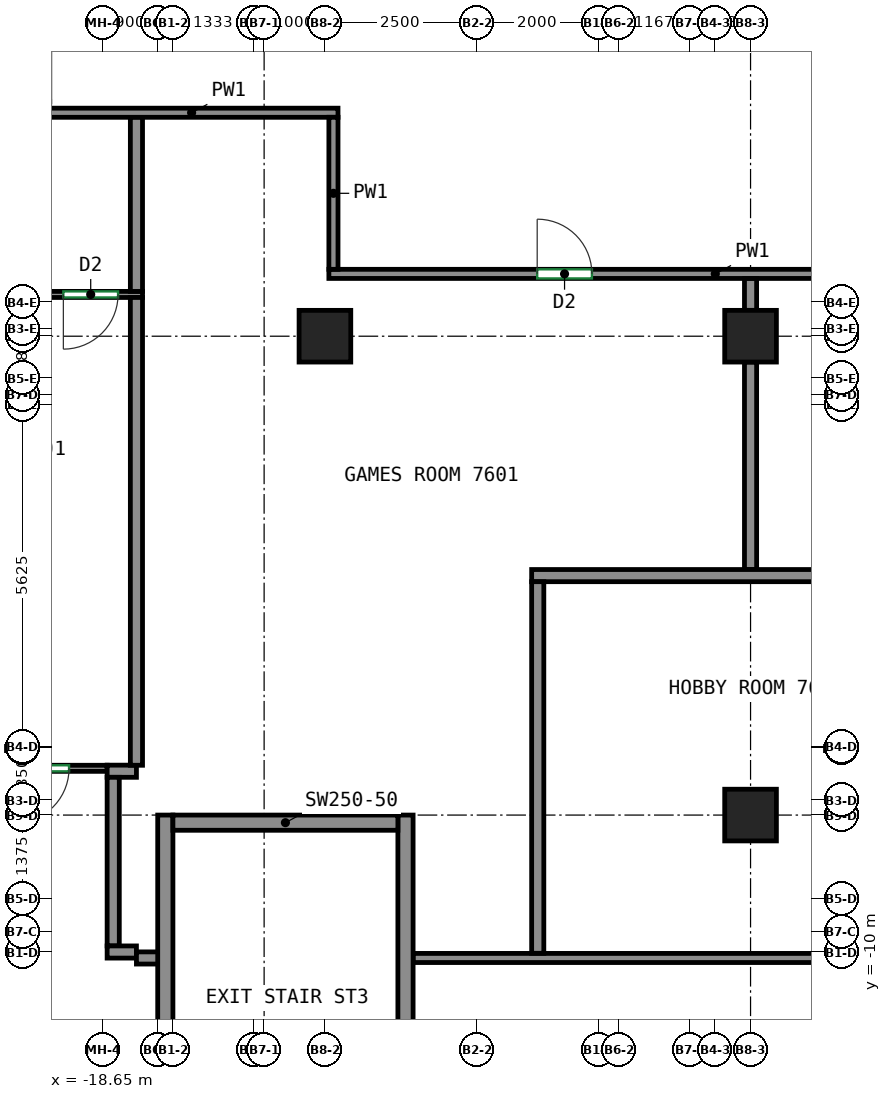
"""IFC4 building model, lengths in metres.
Left out: names, types, materials, properties, quantities, classifications, styles, units other than length and angle.
Written with IfcOpenShell. Run it as: python <this file> out.ifc"""

import sys

from ifc_helpers import new_model, si_unit, direction, frame, frame_2d, origin, origin_2d, place, context, subcontext, project, spatial, rectangle, extrude, source, transform, mapped, element, fill, save


model = new_model("IFC4")
c1 = context("Model", 3, precision=1e-05, world=origin(), true_north=direction((0.0, 1.0)))
c2 = subcontext(c1, "Body", "Model", "MODEL_VIEW")
j1 = project(units=[si_unit("LENGTHUNIT", "METRE"), si_unit("PLANEANGLEUNIT", "RADIAN")], contexts=[c1])
p1 = place(None, origin())
s1 = spatial("IfcSite", under=j1, at=p1, CompositionType="ELEMENT")
p2 = place(p1, origin())
s2 = spatial("IfcBuilding", under=s1, at=p2, CompositionType="ELEMENT")
p3 = place(p2, frame((0.0, 0.0, 305.2)))
s3 = spatial("IfcBuildingStorey", under=s2, at=p3, CompositionType="ELEMENT", Elevation=305.2)
m1 = source(origin(), c2, "Body", "SweptSolid", [
    extrude(rectangle(XDim=0.85, YDim=0.85, at=origin_2d()), origin(), (0.0, 0.0, 1.0), 3.12),
])
for number, where, z_axis, x_axis in (
    (1, (-15.0, 0.125, 0.0), (0.0, 0.0, 1.0), (1.0, 0.0, 0.0)),
    (2, (-8.0, -7.75, 0.0), (0.0, 0.0, 1.0), (1.0, 0.0, 0.0)),
    (3, (-8.0, 0.125, 0.0), (0.0, 0.0, 1.0), (1.0, 0.0, 0.0)),
):
    element("IfcColumn", number, at=place(p3, frame(where, z_axis=z_axis, x_axis=x_axis)), inside=s3, PredefinedType="COLUMN", context=c2, shape_type="MappedRepresentation", body=[
        mapped(m1, transform((0.0, 0.0, 0.0))),
    ])
m2 = source(origin(), c2, "Body", "SweptSolid", [
    extrude(rectangle(XDim=8.0, YDim=0.25, at=frame_2d((4.0, 0.0))), origin(), (0.0, 0.0, 1.0), 3.12),
])
for number, where, z_axis, x_axis in (
    (4, (-17.625, -15.75, 0.0), (0.0, 0.0, 1.0), (0.0, 1.0, 0.0)),
    (5, (-13.675, -15.75, 0.0), (0.0, 0.0, 1.0), (0.0, 1.0, 0.0)),
):
    element("IfcWall", number, at=place(p3, frame(where, z_axis=z_axis, x_axis=x_axis)), inside=s3, PredefinedType="SHEAR", context=c2, shape_type="MappedRepresentation", body=[
        mapped(m2, transform((0.0, 0.0, 0.0))),
    ])
m3 = source(origin(), c2, "Body", "SweptSolid", [
    extrude(rectangle(XDim=3.7, YDim=0.25, at=frame_2d((1.85, 0.0))), origin(), (0.0, 0.0, 1.0), 3.12),
])
p4 = place(p3, frame((-17.5, -7.875, 0.0), z_axis=(0.0, 0.0, 1.0), x_axis=(1.0, 0.0, 0.0)))
e6 = element("IfcWall", 6, at=p4, inside=s3, PredefinedType="SHEAR", context=c2, shape_type="MappedRepresentation", body=[
    mapped(m3, transform((0.0, 0.0, 0.0))),
])
p5 = place(p3, frame((-19.6, 3.8, 0.0), z_axis=(0.0, 0.0, 1.0), x_axis=(1.0, 0.0, 0.0)))
e7 = element("IfcWall", 7, at=p5, inside=s3, PredefinedType="PARTITIONING", context=c2, shape_type="SweptSolid", body=[
    extrude(rectangle(XDim=4.815, YDim=0.15, at=frame_2d((2.408, 0.0))), origin(), (0.0, 0.0, 1.0), 3.12),
])
p6 = place(p3, frame((-14.935, 1.15, 0.0), z_axis=(0.0, 0.0, 1.0), x_axis=(1.0, 0.0, 0.0)))
e8 = element("IfcWall", 8, at=p6, inside=s3, PredefinedType="PARTITIONING", context=c2, shape_type="SweptSolid", body=[
    extrude(rectangle(XDim=12.71, YDim=0.15, at=frame_2d((6.355, 0.0))), origin(), (0.0, 0.0, 1.0), 3.12),
])
p7 = place(p6, frame((3.426, 0.0, 0.0)))
e9 = element("IfcOpeningElement", 9, at=p7, cuts=e8, PredefinedType="OPENING", context=c2, shape_type="SweptSolid", body=[
    extrude(rectangle(XDim=0.9, YDim=2.1, at=frame_2d((0.45, 1.05))), frame((0.0, 0.085, 0.0), z_axis=(0.0, -1.0, 0.0), x_axis=(1.0, 0.0, 0.0)), (0.0, 0.0, 1.0), 0.17),
])
p8 = place(p6, frame((9.571, 0.0, 0.0)))
e10 = element("IfcOpeningElement", 10, at=p8, cuts=e8, PredefinedType="OPENING", context=c2, shape_type="SweptSolid", body=[
    extrude(rectangle(XDim=0.9, YDim=2.1, at=frame_2d((0.45, 1.05))), frame((0.0, 0.085, 0.0), z_axis=(0.0, -1.0, 0.0), x_axis=(1.0, 0.0, 0.0)), (0.0, 0.0, 1.0), 0.17),
])
p9 = place(p3, frame((-14.86, 3.725, 0.0), z_axis=(0.0, 0.0, 1.0), x_axis=(0.0, -1.0, 0.0)))
e11 = element("IfcWall", 11, at=p9, inside=s3, PredefinedType="PARTITIONING", context=c2, shape_type="SweptSolid", body=[
    extrude(rectangle(XDim=2.5, YDim=0.15, at=frame_2d((1.25, 0.0))), origin(), (0.0, 0.0, 1.0), 3.12),
])
p10 = place(p3, frame((-13.55, -10.1, 0.0), z_axis=(0.0, 0.0, 1.0), x_axis=(1.0, 0.0, 0.0)))
e12 = element("IfcWall", 12, at=p10, inside=s3, PredefinedType="PARTITIONING", context=c2, shape_type="SweptSolid", body=[
    extrude(rectangle(XDim=30.65, YDim=0.15, at=frame_2d((15.325, 0.0))), origin(), (0.0, 0.0, 1.0), 3.12),
])
p11 = place(p10, frame((6.956, 0.0, 0.0)))
e13 = element("IfcOpeningElement", 13, at=p11, cuts=e12, PredefinedType="OPENING", context=c2, shape_type="SweptSolid", body=[
    extrude(rectangle(XDim=0.9, YDim=2.1, at=frame_2d((0.45, 1.05))), frame((0.0, 0.085, 0.0), z_axis=(0.0, -1.0, 0.0), x_axis=(1.0, 0.0, 0.0)), (0.0, 0.0, 1.0), 0.17),
])
p12 = place(p10, frame((10.643, 0.0, 0.0)))
e14 = element("IfcOpeningElement", 14, at=p12, cuts=e12, PredefinedType="OPENING", context=c2, shape_type="SweptSolid", body=[
    extrude(rectangle(XDim=0.9, YDim=2.1, at=frame_2d((0.45, 1.05))), frame((0.0, 0.085, 0.0), z_axis=(0.0, -1.0, 0.0), x_axis=(1.0, 0.0, 0.0)), (0.0, 0.0, 1.0), 0.17),
])
p13 = place(p10, frame((24.155, 0.0, 0.0)))
e15 = element("IfcOpeningElement", 15, at=p13, cuts=e12, PredefinedType="OPENING", context=c2, shape_type="SweptSolid", body=[
    extrude(rectangle(XDim=0.9, YDim=2.1, at=frame_2d((0.45, 1.05))), frame((0.0, 0.085, 0.0), z_axis=(0.0, -1.0, 0.0), x_axis=(1.0, 0.0, 0.0)), (0.0, 0.0, 1.0), 0.17),
])
p14 = place(p3, frame((-18.582, -6.981, 0.0), z_axis=(0.0, 0.0, 1.0), x_axis=(-1.0, 0.0, 0.0)))
e16 = element("IfcWall", 16, at=p14, inside=s3, PredefinedType="PARTITIONING", context=c2, shape_type="SweptSolid", body=[
    extrude(rectangle(XDim=6.668, YDim=0.1, at=frame_2d((3.334, 0.0))), origin(), (0.0, 0.0, 1.0), 3.12),
])
p15 = place(p14, frame((0.626, 0.0, 0.0)))
e17 = element("IfcOpeningElement", 17, at=p15, cuts=e16, PredefinedType="OPENING", context=c2, shape_type="SweptSolid", body=[
    extrude(rectangle(XDim=0.9, YDim=2.1, at=frame_2d((0.45, 1.05))), frame((0.0, 0.06, 0.0), z_axis=(0.0, -1.0, 0.0), x_axis=(1.0, 0.0, 0.0)), (0.0, 0.0, 1.0), 0.12),
])
p16 = place(p3, frame((-18.582, -7.029, 0.0), z_axis=(0.0, 0.0, 1.0), x_axis=(1.0, 0.0, 0.0)))
e18 = element("IfcWall", 18, at=p16, inside=s3, PredefinedType="PARTITIONING", context=c2, shape_type="SweptSolid", body=[
    extrude(rectangle(XDim=0.482, YDim=0.2, at=frame_2d((0.241, 0.0))), origin(), (0.0, 0.0, 1.0), 3.12),
])
p17 = place(p3, frame((-18.482, -9.902, 0.0), z_axis=(0.0, 0.0, 1.0), x_axis=(0.0, 1.0, 0.0)))
e19 = element("IfcWall", 19, at=p17, inside=s3, PredefinedType="PARTITIONING", context=c2, shape_type="SweptSolid", body=[
    extrude(rectangle(XDim=2.773, YDim=0.2, at=frame_2d((1.387, 0.0))), origin(), (0.0, 0.0, 1.0), 3.12),
])
p18 = place(p3, frame((-18.1, -10.002, 0.0), z_axis=(0.0, 0.0, 1.0), x_axis=(-1.0, 0.0, 0.0)))
e20 = element("IfcWall", 20, at=p18, inside=s3, PredefinedType="PARTITIONING", context=c2, shape_type="SweptSolid", body=[
    extrude(rectangle(XDim=0.482, YDim=0.2, at=frame_2d((0.241, 0.0))), origin(), (0.0, 0.0, 1.0), 3.12),
])
p19 = place(p3, frame((-17.7, -10.1, 0.0), z_axis=(0.0, 0.0, 1.0), x_axis=(-1.0, 0.0, 0.0)))
e21 = element("IfcWall", 21, at=p19, inside=s3, PredefinedType="PARTITIONING", context=c2, shape_type="SweptSolid", body=[
    extrude(rectangle(XDim=0.4, YDim=0.2, at=frame_2d((0.2, 0.0))), origin(), (0.0, 0.0, 1.0), 3.12),
])
p20 = place(p3, frame((-18.0, 0.812, 0.0), z_axis=(0.0, 0.0, 1.0), x_axis=(-1.0, 0.0, 0.0)))
e22 = element("IfcWall", 22, at=p20, inside=s3, PredefinedType="PARTITIONING", context=c2, shape_type="SweptSolid", body=[
    extrude(rectangle(XDim=7.25, YDim=0.1, at=frame_2d((3.625, 0.0))), origin(), (0.0, 0.0, 1.0), 3.12),
])
p21 = place(p20, frame((0.402, 0.0, 0.0)))
e23 = element("IfcOpeningElement", 23, at=p21, cuts=e22, PredefinedType="OPENING", context=c2, shape_type="SweptSolid", body=[
    extrude(rectangle(XDim=0.9, YDim=2.1, at=frame_2d((0.45, 1.05))), frame((0.0, 0.06, 0.0), z_axis=(0.0, -1.0, 0.0), x_axis=(1.0, 0.0, 0.0)), (0.0, 0.0, 1.0), 0.12),
])
p22 = place(p3, frame((-18.1, -6.931, 0.0), z_axis=(0.0, 0.0, 1.0), x_axis=(0.0, 1.0, 0.0)))
e24 = element("IfcWall", 24, at=p22, inside=s3, PredefinedType="PARTITIONING", context=c2, shape_type="SweptSolid", body=[
    extrude(rectangle(XDim=7.693, YDim=0.2, at=frame_2d((3.846, 0.0))), origin(), (0.0, 0.0, 1.0), 3.12),
])
p23 = place(p3, frame((-18.1, 0.862, 0.0), z_axis=(0.0, 0.0, 1.0), x_axis=(0.0, 1.0, 0.0)))
e25 = element("IfcWall", 25, at=p23, inside=s3, PredefinedType="PARTITIONING", context=c2, shape_type="SweptSolid", body=[
    extrude(rectangle(XDim=2.861, YDim=0.2, at=frame_2d((1.43, 0.0))), origin(), (0.0, 0.0, 1.0), 3.12),
])
p24 = place(p3, frame((-8.0, 0.55, 0.0), z_axis=(0.0, 0.0, 1.0), x_axis=(0.0, 1.0, 0.0)))
e26 = element("IfcWall", 26, at=p24, inside=s3, PredefinedType="PARTITIONING", context=c2, shape_type="SweptSolid", body=[
    extrude(rectangle(XDim=0.523, YDim=0.2, at=frame_2d((0.261, 0.0))), origin(), (0.0, 0.0, 1.0), 3.12),
])
p25 = place(p3, frame((-8.0, -3.712, 0.0), z_axis=(0.0, 0.0, 1.0), x_axis=(0.0, 1.0, 0.0)))
e27 = element("IfcWall", 27, at=p25, inside=s3, PredefinedType="PARTITIONING", context=c2, shape_type="SweptSolid", body=[
    extrude(rectangle(XDim=3.412, YDim=0.2, at=frame_2d((1.706, 0.0))), origin(), (0.0, 0.0, 1.0), 3.12),
])
p26 = place(p3, frame((-11.6, -3.812, 0.0), z_axis=(0.0, 0.0, 1.0), x_axis=(1.0, 0.0, 0.0)))
e28 = element("IfcWall", 28, at=p26, inside=s3, PredefinedType="PARTITIONING", context=c2, shape_type="SweptSolid", body=[
    extrude(rectangle(XDim=28.2, YDim=0.2, at=frame_2d((14.1, 0.0))), origin(), (0.0, 0.0, 1.0), 3.12),
])
p27 = place(p3, frame((-11.5, -10.023, 0.0), z_axis=(0.0, 0.0, 1.0), x_axis=(0.0, 1.0, 0.0)))
e29 = element("IfcWall", 29, at=p27, inside=s3, PredefinedType="PARTITIONING", context=c2, shape_type="SweptSolid", body=[
    extrude(rectangle(XDim=6.111, YDim=0.2, at=frame_2d((3.055, 0.0))), origin(), (0.0, 0.0, 1.0), 3.12),
])
p28 = place(p15, origin())
e30 = element("IfcDoor", 30, at=p28, inside=s3, OperationType="SINGLE_SWING_RIGHT", PredefinedType="DOOR", context=c2, shape_type="SweptSolid", body=[
    extrude(rectangle(XDim=0.9, YDim=2.1, at=frame_2d((0.45, 1.05))), frame((0.0, 0.025, 0.0), z_axis=(0.0, -1.0, 0.0), x_axis=(1.0, 0.0, 0.0)), (0.0, 0.0, 1.0), 0.05),
])
fill(e17, e30)
p29 = place(p21, origin())
e31 = element("IfcDoor", 31, at=p29, inside=s3, OperationType="SINGLE_SWING_RIGHT", PredefinedType="DOOR", context=c2, shape_type="SweptSolid", body=[
    extrude(rectangle(XDim=0.9, YDim=2.1, at=frame_2d((0.45, 1.05))), frame((0.0, 0.025, 0.0), z_axis=(0.0, -1.0, 0.0), x_axis=(1.0, 0.0, 0.0)), (0.0, 0.0, 1.0), 0.05),
])
fill(e23, e31)
p30 = place(p7, origin())
e32 = element("IfcDoor", 32, at=p30, inside=s3, OperationType="SINGLE_SWING_LEFT", PredefinedType="DOOR", context=c2, shape_type="SweptSolid", body=[
    extrude(rectangle(XDim=0.9, YDim=2.1, at=frame_2d((0.45, 1.05))), frame((0.0, 0.025, 0.0), z_axis=(0.0, -1.0, 0.0), x_axis=(1.0, 0.0, 0.0)), (0.0, 0.0, 1.0), 0.05),
])
fill(e9, e32)
save(model, sys.argv[1])
